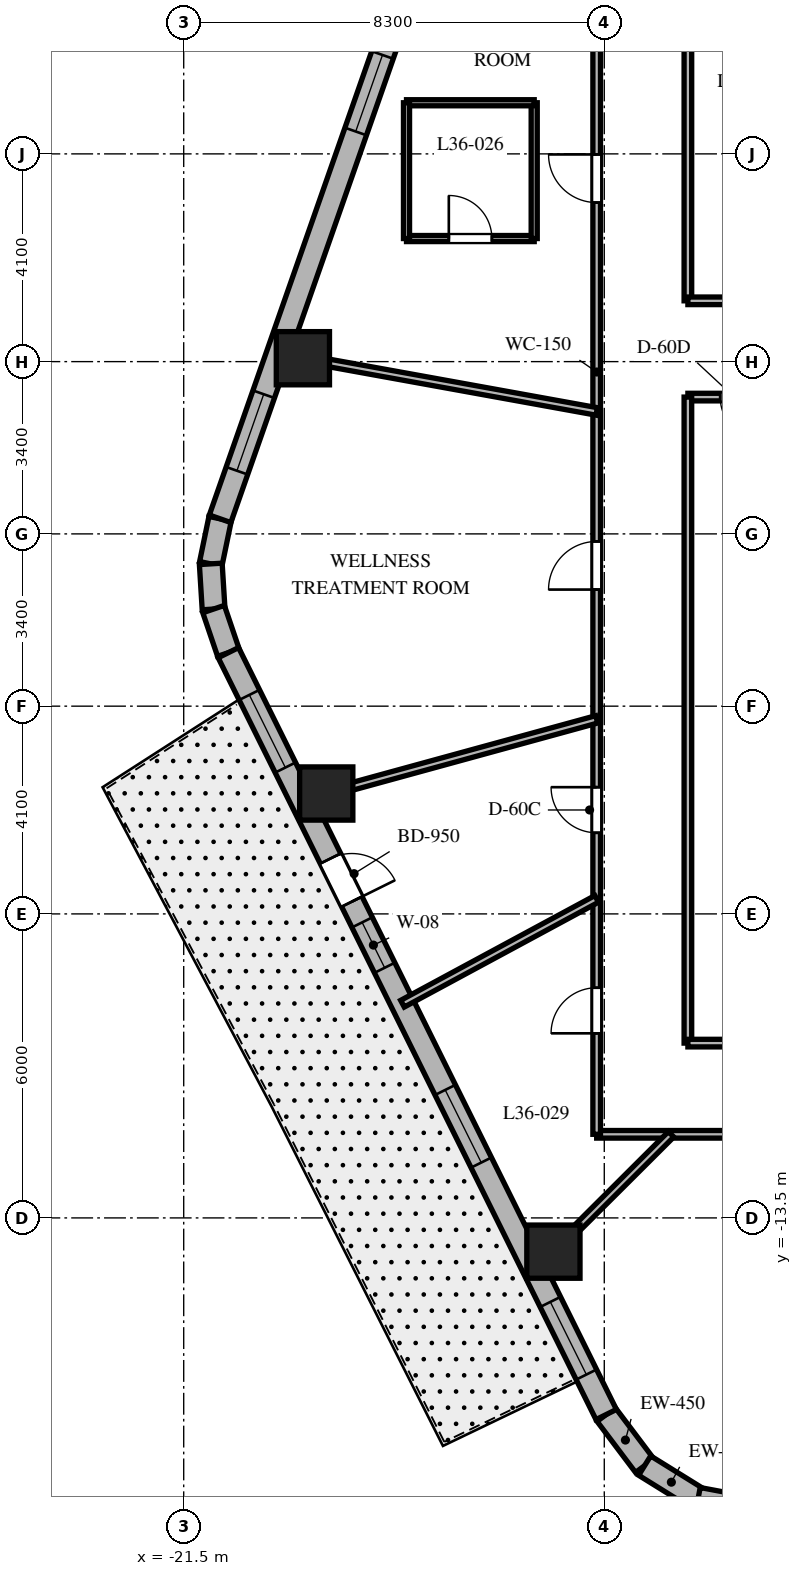
"""IFC4 building model, lengths in metres.
Left out: names, types, materials, properties, quantities, classifications, styles, units other than length and angle.
Written with IfcOpenShell. Run it as: python <this file> out.ifc"""

import sys

from ifc_helpers import new_model, si_unit, direction, frame, frame_2d, origin, origin_2d, place, context, subcontext, project, spatial, rectangle, extrude, element, fill, save


model = new_model("IFC4")
c1 = context("Model", 3, precision=1e-05, world=origin(), true_north=direction((0.0, 1.0)))
c2 = subcontext(c1, "Body", "Model", "MODEL_VIEW")
j1 = project(units=[si_unit("LENGTHUNIT", "METRE"), si_unit("PLANEANGLEUNIT", "RADIAN")], contexts=[c1])
p1 = place(None, origin())
s1 = spatial("IfcSite", under=j1, at=p1, CompositionType="ELEMENT")
p2 = place(p1, origin())
s2 = spatial("IfcBuilding", under=s1, at=p2, CompositionType="ELEMENT")
p3 = place(p2, frame((0.0, 0.0, 148.0)))
s3 = spatial("IfcBuildingStorey", under=s2, at=p3, CompositionType="ELEMENT", Elevation=148.0)
for number, where, z_axis, x_axis in (
    (1, (-19.148, 3.467, 0.0), (0.0, 0.0, 1.0), (1.0, 0.0, 0.0)),
    (2, (-18.687, -5.124, 0.0), (0.0, 0.0, 1.0), (1.0, 0.0, 0.0)),
    (3, (-14.204, -14.166, 0.0), (0.0, 0.0, 1.0), (1.0, 0.0, 0.0)),
):
    element("IfcColumn", number, at=place(p3, frame(where, z_axis=z_axis, x_axis=x_axis)), inside=s3, PredefinedType="COLUMN", context=c2, shape_type="SweptSolid", body=[
        extrude(rectangle(XDim=1.05, YDim=1.05, at=origin_2d()), origin(), (0.0, 0.0, 1.0), 3.7),
    ])
p4 = place(p3, frame((-13.162, -17.381, 0.0), z_axis=(0.0, 0.0, 1.0), x_axis=(0.601515770517, -0.798860925205, 0.0)))
e4 = element("IfcWall", 4, at=p4, inside=s3, PredefinedType="SOLIDWALL", context=c2, shape_type="SweptSolid", body=[
    extrude(rectangle(XDim=1.262, YDim=0.45, at=frame_2d((0.631, 0.0))), origin(), (0.0, 0.0, 1.0), 3.4),
])
p5 = place(p3, frame((-12.403, -18.389, 0.0), z_axis=(0.0, 0.0, 1.0), x_axis=(0.849795170926, -0.527113049991, 0.0)))
e5 = element("IfcWall", 5, at=p5, inside=s3, PredefinedType="SOLIDWALL", context=c2, shape_type="SweptSolid", body=[
    extrude(rectangle(XDim=1.241, YDim=0.45, at=frame_2d((0.62, 0.0))), origin(), (0.0, 0.0, 1.0), 3.4),
])
p6 = place(p3, frame((-11.349, -19.043, 0.0), z_axis=(0.0, 0.0, 1.0), x_axis=(0.982931267051, -0.183973161772, 0.0)))
e6 = element("IfcWall", 6, at=p6, inside=s3, PredefinedType="SOLIDWALL", context=c2, shape_type="SweptSolid", body=[
    extrude(rectangle(XDim=1.262, YDim=0.45, at=frame_2d((0.631, 0.0))), origin(), (0.0, 0.0, 1.0), 3.4),
])
p7 = place(p3, frame((-20.782, 0.298, 0.0), z_axis=(0.0, 0.0, 1.0), x_axis=(-0.202570068411, -0.979267771033, 0.0)))
e7 = element("IfcWall", 7, at=p7, inside=s3, PredefinedType="SOLIDWALL", context=c2, shape_type="SweptSolid", body=[
    extrude(rectangle(XDim=0.909, YDim=0.45, at=frame_2d((0.454, 0.0))), origin(), (0.0, 0.0, 1.0), 3.4),
])
p8 = place(p3, frame((-20.966, -0.592, 0.0), z_axis=(0.0, 0.0, 1.0), x_axis=(0.061748898935, -0.998091715966, 0.0)))
e8 = element("IfcWall", 8, at=p8, inside=s3, PredefinedType="SOLIDWALL", context=c2, shape_type="SweptSolid", body=[
    extrude(rectangle(XDim=0.894, YDim=0.45, at=frame_2d((0.447, 0.0))), origin(), (0.0, 0.0, 1.0), 3.4),
])
p9 = place(p3, frame((-20.911, -1.484, 0.0), z_axis=(0.0, 0.0, 1.0), x_axis=(0.321623334353, -0.946867694453, 0.0)))
e9 = element("IfcWall", 9, at=p9, inside=s3, PredefinedType="SOLIDWALL", context=c2, shape_type="SweptSolid", body=[
    extrude(rectangle(XDim=0.909, YDim=0.45, at=frame_2d((0.454, 0.0))), origin(), (0.0, 0.0, 1.0), 3.4),
])
p10 = place(p3, frame((-14.937, 16.993, 0.0), z_axis=(0.0, 0.0, 1.0), x_axis=(-0.330431575061, -0.943829949834, 0.0)))
e10 = element("IfcWall", 10, at=p10, inside=s3, PredefinedType="SOLIDWALL", context=c2, shape_type="SweptSolid", body=[
    extrude(rectangle(XDim=17.689, YDim=0.45, at=frame_2d((8.844, 0.0))), origin(), (0.0, 0.0, 1.0), 3.4),
])
p11 = place(p10, frame((0.95, 0.0, 0.8)))
e11 = element("IfcOpeningElement", 11, at=p11, cuts=e10, PredefinedType="OPENING", context=c2, shape_type="SweptSolid", body=[
    extrude(rectangle(XDim=1.6, YDim=1.75, at=frame_2d((0.8, 0.875))), frame((0.0, 0.235, 0.0), z_axis=(0.0, -1.0, 0.0), x_axis=(1.0, 0.0, 0.0)), (0.0, 0.0, 1.0), 0.47),
])
p12 = place(p10, frame((7.99, 0.0, 0.8)))
e12 = element("IfcOpeningElement", 12, at=p12, cuts=e10, PredefinedType="OPENING", context=c2, shape_type="SweptSolid", body=[
    extrude(rectangle(XDim=1.6, YDim=1.75, at=frame_2d((0.8, 0.875))), frame((0.0, 0.235, 0.0), z_axis=(0.0, -1.0, 0.0), x_axis=(1.0, 0.0, 0.0)), (0.0, 0.0, 1.0), 0.47),
])
p13 = place(p10, frame((15.084, 0.0, 0.8)))
e13 = element("IfcOpeningElement", 13, at=p13, cuts=e10, PredefinedType="OPENING", context=c2, shape_type="SweptSolid", body=[
    extrude(rectangle(XDim=1.6, YDim=1.75, at=frame_2d((0.8, 0.875))), frame((0.0, 0.235, 0.0), z_axis=(0.0, -1.0, 0.0), x_axis=(1.0, 0.0, 0.0)), (0.0, 0.0, 1.0), 0.47),
])
p14 = place(p3, frame((-20.618, -2.344, 0.0), z_axis=(0.0, 0.0, 1.0), x_axis=(0.444243691097, -0.895905990002, 0.0)))
e14 = element("IfcWall", 14, at=p14, inside=s3, PredefinedType="SOLIDWALL", context=c2, shape_type="SweptSolid", body=[
    extrude(rectangle(XDim=16.784, YDim=0.45, at=frame_2d((8.392, 0.0))), origin(), (0.0, 0.0, 1.0), 3.4),
])
p15 = place(p14, frame((4.535, 0.0, 0.0)))
e15 = element("IfcOpeningElement", 15, at=p15, cuts=e14, PredefinedType="OPENING", context=c2, shape_type="SweptSolid", body=[
    extrude(rectangle(XDim=0.95, YDim=2.15, at=frame_2d((0.475, 1.075))), frame((0.0, 0.235, 0.0), z_axis=(0.0, -1.0, 0.0), x_axis=(1.0, 0.0, 0.0)), (0.0, 0.0, 1.0), 0.47),
])
p16 = place(p14, frame((0.931, 0.0, 0.8)))
e16 = element("IfcOpeningElement", 16, at=p16, cuts=e14, PredefinedType="OPENING", context=c2, shape_type="SweptSolid", body=[
    extrude(rectangle(XDim=1.6, YDim=1.75, at=frame_2d((0.8, 0.875))), frame((0.0, 0.235, 0.0), z_axis=(0.0, -1.0, 0.0), x_axis=(1.0, 0.0, 0.0)), (0.0, 0.0, 1.0), 0.47),
])
p17 = place(p14, frame((5.942, 0.0, 0.8)))
e17 = element("IfcOpeningElement", 17, at=p17, cuts=e14, PredefinedType="OPENING", context=c2, shape_type="SweptSolid", body=[
    extrude(rectangle(XDim=1.0, YDim=1.65, at=frame_2d((0.5, 0.825))), frame((0.0, 0.235, 0.0), z_axis=(0.0, -1.0, 0.0), x_axis=(1.0, 0.0, 0.0)), (0.0, 0.0, 1.0), 0.47),
])
p18 = place(p14, frame((9.633, 0.0, 0.8)))
e18 = element("IfcOpeningElement", 18, at=p18, cuts=e14, PredefinedType="OPENING", context=c2, shape_type="SweptSolid", body=[
    extrude(rectangle(XDim=1.6, YDim=1.75, at=frame_2d((0.8, 0.875))), frame((0.0, 0.235, 0.0), z_axis=(0.0, -1.0, 0.0), x_axis=(1.0, 0.0, 0.0)), (0.0, 0.0, 1.0), 0.47),
])
p19 = place(p14, frame((14.303, 0.0, 0.8)))
e19 = element("IfcOpeningElement", 19, at=p19, cuts=e14, PredefinedType="OPENING", context=c2, shape_type="SweptSolid", body=[
    extrude(rectangle(XDim=1.6, YDim=1.75, at=frame_2d((0.8, 0.875))), frame((0.0, 0.235, 0.0), z_axis=(0.0, -1.0, 0.0), x_axis=(1.0, 0.0, 0.0)), (0.0, 0.0, 1.0), 0.47),
])
p20 = place(p3, frame((13.35, -11.85, 0.0), z_axis=(0.0, 0.0, 1.0), x_axis=(-1.0, 0.0, 0.0)))
e20 = element("IfcWall", 20, at=p20, inside=s3, PredefinedType="PARTITIONING", context=c2, shape_type="SweptSolid", body=[
    extrude(rectangle(XDim=26.7, YDim=0.15, at=frame_2d((13.35, 0.0))), origin(), (0.0, 0.0, 1.0), 2.84),
])
p21 = place(p20, frame((20.682, 0.0, 0.0)))
e21 = element("IfcOpeningElement", 21, at=p21, cuts=e20, PredefinedType="OPENING", context=c2, shape_type="SweptSolid", body=[
    extrude(rectangle(XDim=0.95, YDim=2.03, at=frame_2d((0.475, 1.015))), frame((0.0, 0.085, 0.0), z_axis=(0.0, -1.0, 0.0), x_axis=(1.0, 0.0, 0.0)), (0.0, 0.0, 1.0), 0.17),
])
p22 = place(p20, frame((12.362, 0.0, 0.0)))
e22 = element("IfcOpeningElement", 22, at=p22, cuts=e20, PredefinedType="OPENING", context=c2, shape_type="SweptSolid", body=[
    extrude(rectangle(XDim=0.95, YDim=2.03, at=frame_2d((0.475, 1.015))), frame((0.0, 0.085, 0.0), z_axis=(0.0, -1.0, 0.0), x_axis=(1.0, 0.0, 0.0)), (0.0, 0.0, 1.0), 0.17),
])
p23 = place(p20, frame((3.995, 0.0, 0.0)))
e23 = element("IfcOpeningElement", 23, at=p23, cuts=e20, PredefinedType="OPENING", context=c2, shape_type="SweptSolid", body=[
    extrude(rectangle(XDim=0.95, YDim=2.03, at=frame_2d((0.475, 1.015))), frame((0.0, 0.085, 0.0), z_axis=(0.0, -1.0, 0.0), x_axis=(1.0, 0.0, 0.0)), (0.0, 0.0, 1.0), 0.17),
])
p24 = place(p3, frame((-13.35, -11.85, 0.0), z_axis=(0.0, 0.0, 1.0), x_axis=(0.0, 1.0, 0.0)))
e24 = element("IfcWall", 24, at=p24, inside=s3, PredefinedType="PARTITIONING", context=c2, shape_type="SweptSolid", body=[
    extrude(rectangle(XDim=23.7, YDim=0.15, at=frame_2d((11.85, 0.0))), origin(), (0.0, 0.0, 1.0), 2.84),
])
p25 = place(p24, frame((18.389, 0.0, 0.0)))
e25 = element("IfcOpeningElement", 25, at=p25, cuts=e24, PredefinedType="OPENING", context=c2, shape_type="SweptSolid", body=[
    extrude(rectangle(XDim=0.95, YDim=2.03, at=frame_2d((0.475, 1.015))), frame((0.0, 0.085, 0.0), z_axis=(0.0, -1.0, 0.0), x_axis=(1.0, 0.0, 0.0)), (0.0, 0.0, 1.0), 0.17),
])
p26 = place(p24, frame((10.751, 0.0, 0.0)))
e26 = element("IfcOpeningElement", 26, at=p26, cuts=e24, PredefinedType="OPENING", context=c2, shape_type="SweptSolid", body=[
    extrude(rectangle(XDim=0.95, YDim=2.03, at=frame_2d((0.475, 1.015))), frame((0.0, 0.085, 0.0), z_axis=(0.0, -1.0, 0.0), x_axis=(1.0, 0.0, 0.0)), (0.0, 0.0, 1.0), 0.17),
])
p27 = place(p24, frame((5.951, 0.0, 0.0)))
e27 = element("IfcOpeningElement", 27, at=p27, cuts=e24, PredefinedType="OPENING", context=c2, shape_type="SweptSolid", body=[
    extrude(rectangle(XDim=0.9, YDim=2.03, at=frame_2d((0.45, 1.015))), frame((0.0, 0.085, 0.0), z_axis=(0.0, -1.0, 0.0), x_axis=(1.0, 0.0, 0.0)), (0.0, 0.0, 1.0), 0.17),
])
p28 = place(p24, frame((1.993, 0.0, 0.0)))
e28 = element("IfcOpeningElement", 28, at=p28, cuts=e24, PredefinedType="OPENING", context=c2, shape_type="SweptSolid", body=[
    extrude(rectangle(XDim=0.9, YDim=2.03, at=frame_2d((0.45, 1.015))), frame((0.0, 0.085, 0.0), z_axis=(0.0, -1.0, 0.0), x_axis=(1.0, 0.0, 0.0)), (0.0, 0.0, 1.0), 0.17),
])
p29 = place(p3, frame((-11.55, 10.05, 0.0), z_axis=(0.0, 0.0, 1.0), x_axis=(0.0, -1.0, 0.0)))
e29 = element("IfcWall", 29, at=p29, inside=s3, PredefinedType="PARTITIONING", context=c2, shape_type="SweptSolid", body=[
    extrude(rectangle(XDim=5.45, YDim=0.15, at=frame_2d((2.725, 0.0))), origin(), (0.0, 0.0, 1.0), 2.84),
])
p30 = place(p3, frame((-11.55, 4.6, 0.0), z_axis=(0.0, 0.0, 1.0), x_axis=(1.0, 0.0, 0.0)))
e30 = element("IfcWall", 30, at=p30, inside=s3, PredefinedType="PARTITIONING", context=c2, shape_type="SweptSolid", body=[
    extrude(rectangle(XDim=2.125, YDim=0.15, at=frame_2d((1.062, 0.0))), origin(), (0.0, 0.0, 1.0), 3.4),
])
p31 = place(p3, frame((-9.425, 2.7, 0.0), z_axis=(0.0, 0.0, 1.0), x_axis=(-1.0, 0.0, 0.0)))
e31 = element("IfcWall", 31, at=p31, inside=s3, PredefinedType="PARTITIONING", context=c2, shape_type="SweptSolid", body=[
    extrude(rectangle(XDim=2.125, YDim=0.15, at=frame_2d((1.062, 0.0))), origin(), (0.0, 0.0, 1.0), 3.4),
])
p32 = place(p31, frame((0.637, 0.0, 0.0)))
e32 = element("IfcOpeningElement", 32, at=p32, cuts=e31, PredefinedType="OPENING", context=c2, shape_type="SweptSolid", body=[
    extrude(rectangle(XDim=0.85, YDim=2.03, at=frame_2d((0.425, 1.015))), frame((0.0, 0.085, 0.0), z_axis=(0.0, -1.0, 0.0), x_axis=(1.0, 0.0, 0.0)), (0.0, 0.0, 1.0), 0.17),
])
p33 = place(p3, frame((-11.55, 2.7, 0.0), z_axis=(0.0, 0.0, 1.0), x_axis=(0.0, -1.0, 0.0)))
e33 = element("IfcWall", 33, at=p33, inside=s3, PredefinedType="PARTITIONING", context=c2, shape_type="SweptSolid", body=[
    extrude(rectangle(XDim=12.75, YDim=0.15, at=frame_2d((6.375, 0.0))), origin(), (0.0, 0.0, 1.0), 2.84),
])
p34 = place(p3, frame((-11.55, -10.05, 0.0), z_axis=(0.0, 0.0, 1.0), x_axis=(1.0, 0.0, 0.0)))
e34 = element("IfcWall", 34, at=p34, inside=s3, PredefinedType="PARTITIONING", context=c2, shape_type="SweptSolid", body=[
    extrude(rectangle(XDim=11.55, YDim=0.15, at=frame_2d((5.775, 0.0))), origin(), (0.0, 0.0, 1.0), 2.84),
])
p35 = place(p3, frame((-13.35, 2.417, 0.0), z_axis=(0.0, 0.0, 1.0), x_axis=(-0.98399796473, 0.178179699761, 0.0)))
e35 = element("IfcWall", 35, at=p35, inside=s3, PredefinedType="PARTITIONING", context=c2, shape_type="SweptSolid", body=[
    extrude(rectangle(XDim=6.393, YDim=0.15, at=frame_2d((3.197, 0.0))), origin(), (0.0, 0.0, 1.0), 2.64),
])
p36 = place(p3, frame((-13.35, -3.661, 0.0), z_axis=(0.0, 0.0, 1.0), x_axis=(-0.964397145454, -0.264458211898, 0.0)))
e36 = element("IfcWall", 36, at=p36, inside=s3, PredefinedType="PARTITIONING", context=c2, shape_type="SweptSolid", body=[
    extrude(rectangle(XDim=6.039, YDim=0.15, at=frame_2d((3.019, 0.0))), origin(), (0.0, 0.0, 1.0), 2.64),
])
p37 = place(p3, frame((-13.35, -7.204, 0.0), z_axis=(0.0, 0.0, 1.0), x_axis=(-0.880033329067, -0.474911928394, 0.0)))
e37 = element("IfcWall", 37, at=p37, inside=s3, PredefinedType="PARTITIONING", context=c2, shape_type="SweptSolid", body=[
    extrude(rectangle(XDim=4.355, YDim=0.15, at=frame_2d((2.178, 0.0))), origin(), (0.0, 0.0, 1.0), 2.64),
])
p38 = place(p3, frame((-11.882, -11.85, 0.0), z_axis=(0.0, 0.0, 1.0), x_axis=(-0.708037373639, -0.706174962407, 0.0)))
e38 = element("IfcWall", 38, at=p38, inside=s3, PredefinedType="PARTITIONING", context=c2, shape_type="SweptSolid", body=[
    extrude(rectangle(XDim=3.802, YDim=0.15, at=frame_2d((1.901, 0.0))), origin(), (0.0, 0.0, 1.0), 2.64),
])
p39 = place(p3, frame((-17.103, 5.829, 0.0), z_axis=(0.0, 0.0, 1.0), x_axis=(1.0, 0.0, 0.0)))
e39 = element("IfcWall", 39, at=p39, inside=s3, PredefinedType="PARTITIONING", context=c2, shape_type="SweptSolid", body=[
    extrude(rectangle(XDim=2.52, YDim=0.12, at=frame_2d((1.26, 0.0))), origin(), (0.0, 0.0, 1.0), 2.972),
])
p40 = place(p39, frame((0.835, 0.0, 0.0)))
e40 = element("IfcOpeningElement", 40, at=p40, cuts=e39, PredefinedType="OPENING", context=c2, shape_type="SweptSolid", body=[
    extrude(rectangle(XDim=0.85, YDim=2.03, at=frame_2d((0.425, 1.015))), frame((0.0, 0.07, 0.0), z_axis=(0.0, -1.0, 0.0), x_axis=(1.0, 0.0, 0.0)), (0.0, 0.0, 1.0), 0.14),
])
p41 = place(p3, frame((-14.583, 5.829, 0.0), z_axis=(0.0, 0.0, 1.0), x_axis=(0.0, 1.0, 0.0)))
e41 = element("IfcWall", 41, at=p41, inside=s3, PredefinedType="PARTITIONING", context=c2, shape_type="SweptSolid", body=[
    extrude(rectangle(XDim=2.68, YDim=0.12, at=frame_2d((1.34, 0.0))), origin(), (0.0, 0.0, 1.0), 2.972),
])
p42 = place(p3, frame((-14.583, 8.509, 0.0), z_axis=(0.0, 0.0, 1.0), x_axis=(-1.0, 0.0, 0.0)))
e42 = element("IfcWall", 42, at=p42, inside=s3, PredefinedType="PARTITIONING", context=c2, shape_type="SweptSolid", body=[
    extrude(rectangle(XDim=2.52, YDim=0.12, at=frame_2d((1.26, 0.0))), origin(), (0.0, 0.0, 1.0), 2.972),
])
p43 = place(p3, frame((-17.103, 8.509, 0.0), z_axis=(0.0, 0.0, 1.0), x_axis=(0.0, -1.0, 0.0)))
e43 = element("IfcWall", 43, at=p43, inside=s3, PredefinedType="PARTITIONING", context=c2, shape_type="SweptSolid", body=[
    extrude(rectangle(XDim=2.68, YDim=0.12, at=frame_2d((1.34, 0.0))), origin(), (0.0, 0.0, 1.0), 2.64),
])
p44 = place(p12, origin())
e44 = element("IfcWindow", 44, at=p44, inside=s3, PartitioningType="SINGLE_PANEL", PredefinedType="WINDOW", context=c2, shape_type="SweptSolid", body=[
    extrude(rectangle(XDim=1.6, YDim=1.75, at=frame_2d((0.8, 0.875))), frame((0.0, 0.03, 0.0), z_axis=(0.0, -1.0, 0.0), x_axis=(1.0, 0.0, 0.0)), (0.0, 0.0, 1.0), 0.06),
])
fill(e12, e44)
p45 = place(p13, origin())
e45 = element("IfcWindow", 45, at=p45, inside=s3, PartitioningType="SINGLE_PANEL", PredefinedType="WINDOW", context=c2, shape_type="SweptSolid", body=[
    extrude(rectangle(XDim=1.6, YDim=1.75, at=frame_2d((0.8, 0.875))), frame((0.0, 0.03, 0.0), z_axis=(0.0, -1.0, 0.0), x_axis=(1.0, 0.0, 0.0)), (0.0, 0.0, 1.0), 0.06),
])
fill(e13, e45)
p46 = place(p15, origin())
e46 = element("IfcDoor", 46, at=p46, inside=s3, OperationType="SINGLE_SWING_RIGHT", PredefinedType="DOOR", context=c2, shape_type="SweptSolid", body=[
    extrude(rectangle(XDim=0.95, YDim=2.15, at=frame_2d((0.475, 1.075))), frame((0.0, 0.025, 0.0), z_axis=(0.0, -1.0, 0.0), x_axis=(1.0, 0.0, 0.0)), (0.0, 0.0, 1.0), 0.05),
])
fill(e15, e46)
p47 = place(p16, origin())
e47 = element("IfcWindow", 47, at=p47, inside=s3, PartitioningType="SINGLE_PANEL", PredefinedType="WINDOW", context=c2, shape_type="SweptSolid", body=[
    extrude(rectangle(XDim=1.6, YDim=1.75, at=frame_2d((0.8, 0.875))), frame((0.0, 0.03, 0.0), z_axis=(0.0, -1.0, 0.0), x_axis=(1.0, 0.0, 0.0)), (0.0, 0.0, 1.0), 0.06),
])
fill(e16, e47)
p48 = place(p17, origin())
e48 = element("IfcWindow", 48, at=p48, inside=s3, PartitioningType="SINGLE_PANEL", PredefinedType="WINDOW", context=c2, shape_type="SweptSolid", body=[
    extrude(rectangle(XDim=1.0, YDim=1.65, at=frame_2d((0.5, 0.825))), frame((0.0, 0.03, 0.0), z_axis=(0.0, -1.0, 0.0), x_axis=(1.0, 0.0, 0.0)), (0.0, 0.0, 1.0), 0.06),
])
fill(e17, e48)
p49 = place(p18, origin())
e49 = element("IfcWindow", 49, at=p49, inside=s3, PartitioningType="SINGLE_PANEL", PredefinedType="WINDOW", context=c2, shape_type="SweptSolid", body=[
    extrude(rectangle(XDim=1.6, YDim=1.75, at=frame_2d((0.8, 0.875))), frame((0.0, 0.03, 0.0), z_axis=(0.0, -1.0, 0.0), x_axis=(1.0, 0.0, 0.0)), (0.0, 0.0, 1.0), 0.06),
])
fill(e18, e49)
p50 = place(p19, origin())
e50 = element("IfcWindow", 50, at=p50, inside=s3, PartitioningType="SINGLE_PANEL", PredefinedType="WINDOW", context=c2, shape_type="SweptSolid", body=[
    extrude(rectangle(XDim=1.6, YDim=1.75, at=frame_2d((0.8, 0.875))), frame((0.0, 0.03, 0.0), z_axis=(0.0, -1.0, 0.0), x_axis=(1.0, 0.0, 0.0)), (0.0, 0.0, 1.0), 0.06),
])
fill(e19, e50)
p51 = place(p32, origin())
e51 = element("IfcDoor", 51, at=p51, inside=s3, OperationType="SINGLE_SWING_LEFT", PredefinedType="DOOR", context=c2, shape_type="SweptSolid", body=[
    extrude(rectangle(XDim=0.85, YDim=2.03, at=frame_2d((0.425, 1.015))), frame((0.0, 0.025, 0.0), z_axis=(0.0, -1.0, 0.0), x_axis=(1.0, 0.0, 0.0)), (0.0, 0.0, 1.0), 0.05),
])
fill(e32, e51)
p52 = place(p25, origin())
e52 = element("IfcDoor", 52, at=p52, inside=s3, OperationType="SINGLE_SWING_RIGHT", PredefinedType="DOOR", context=c2, shape_type="SweptSolid", body=[
    extrude(rectangle(XDim=0.95, YDim=2.03, at=frame_2d((0.475, 1.015))), frame((0.0, 0.025, 0.0), z_axis=(0.0, -1.0, 0.0), x_axis=(1.0, 0.0, 0.0)), (0.0, 0.0, 1.0), 0.05),
])
fill(e25, e52)
p53 = place(p40, origin())
e53 = element("IfcDoor", 53, at=p53, inside=s3, OperationType="SINGLE_SWING_LEFT", PredefinedType="DOOR", context=c2, shape_type="SweptSolid", body=[
    extrude(rectangle(XDim=0.85, YDim=2.03, at=frame_2d((0.425, 1.015))), frame((0.0, 0.025, 0.0), z_axis=(0.0, -1.0, 0.0), x_axis=(1.0, 0.0, 0.0)), (0.0, 0.0, 1.0), 0.05),
])
fill(e40, e53)
p54 = place(p26, origin())
e54 = element("IfcDoor", 54, at=p54, inside=s3, OperationType="SINGLE_SWING_LEFT", PredefinedType="DOOR", context=c2, shape_type="SweptSolid", body=[
    extrude(rectangle(XDim=0.95, YDim=2.03, at=frame_2d((0.475, 1.015))), frame((0.0, 0.025, 0.0), z_axis=(0.0, -1.0, 0.0), x_axis=(1.0, 0.0, 0.0)), (0.0, 0.0, 1.0), 0.05),
])
fill(e26, e54)
p55 = place(p27, origin())
e55 = element("IfcDoor", 55, at=p55, inside=s3, OperationType="SINGLE_SWING_RIGHT", PredefinedType="DOOR", context=c2, shape_type="SweptSolid", body=[
    extrude(rectangle(XDim=0.9, YDim=2.03, at=frame_2d((0.45, 1.015))), frame((0.0, 0.025, 0.0), z_axis=(0.0, -1.0, 0.0), x_axis=(1.0, 0.0, 0.0)), (0.0, 0.0, 1.0), 0.05),
])
fill(e27, e55)
p56 = place(p28, origin())
e56 = element("IfcDoor", 56, at=p56, inside=s3, OperationType="SINGLE_SWING_LEFT", PredefinedType="DOOR", context=c2, shape_type="SweptSolid", body=[
    extrude(rectangle(XDim=0.9, YDim=2.03, at=frame_2d((0.45, 1.015))), frame((0.0, 0.025, 0.0), z_axis=(0.0, -1.0, 0.0), x_axis=(1.0, 0.0, 0.0)), (0.0, 0.0, 1.0), 0.05),
])
fill(e28, e56)
save(model, sys.argv[1])
